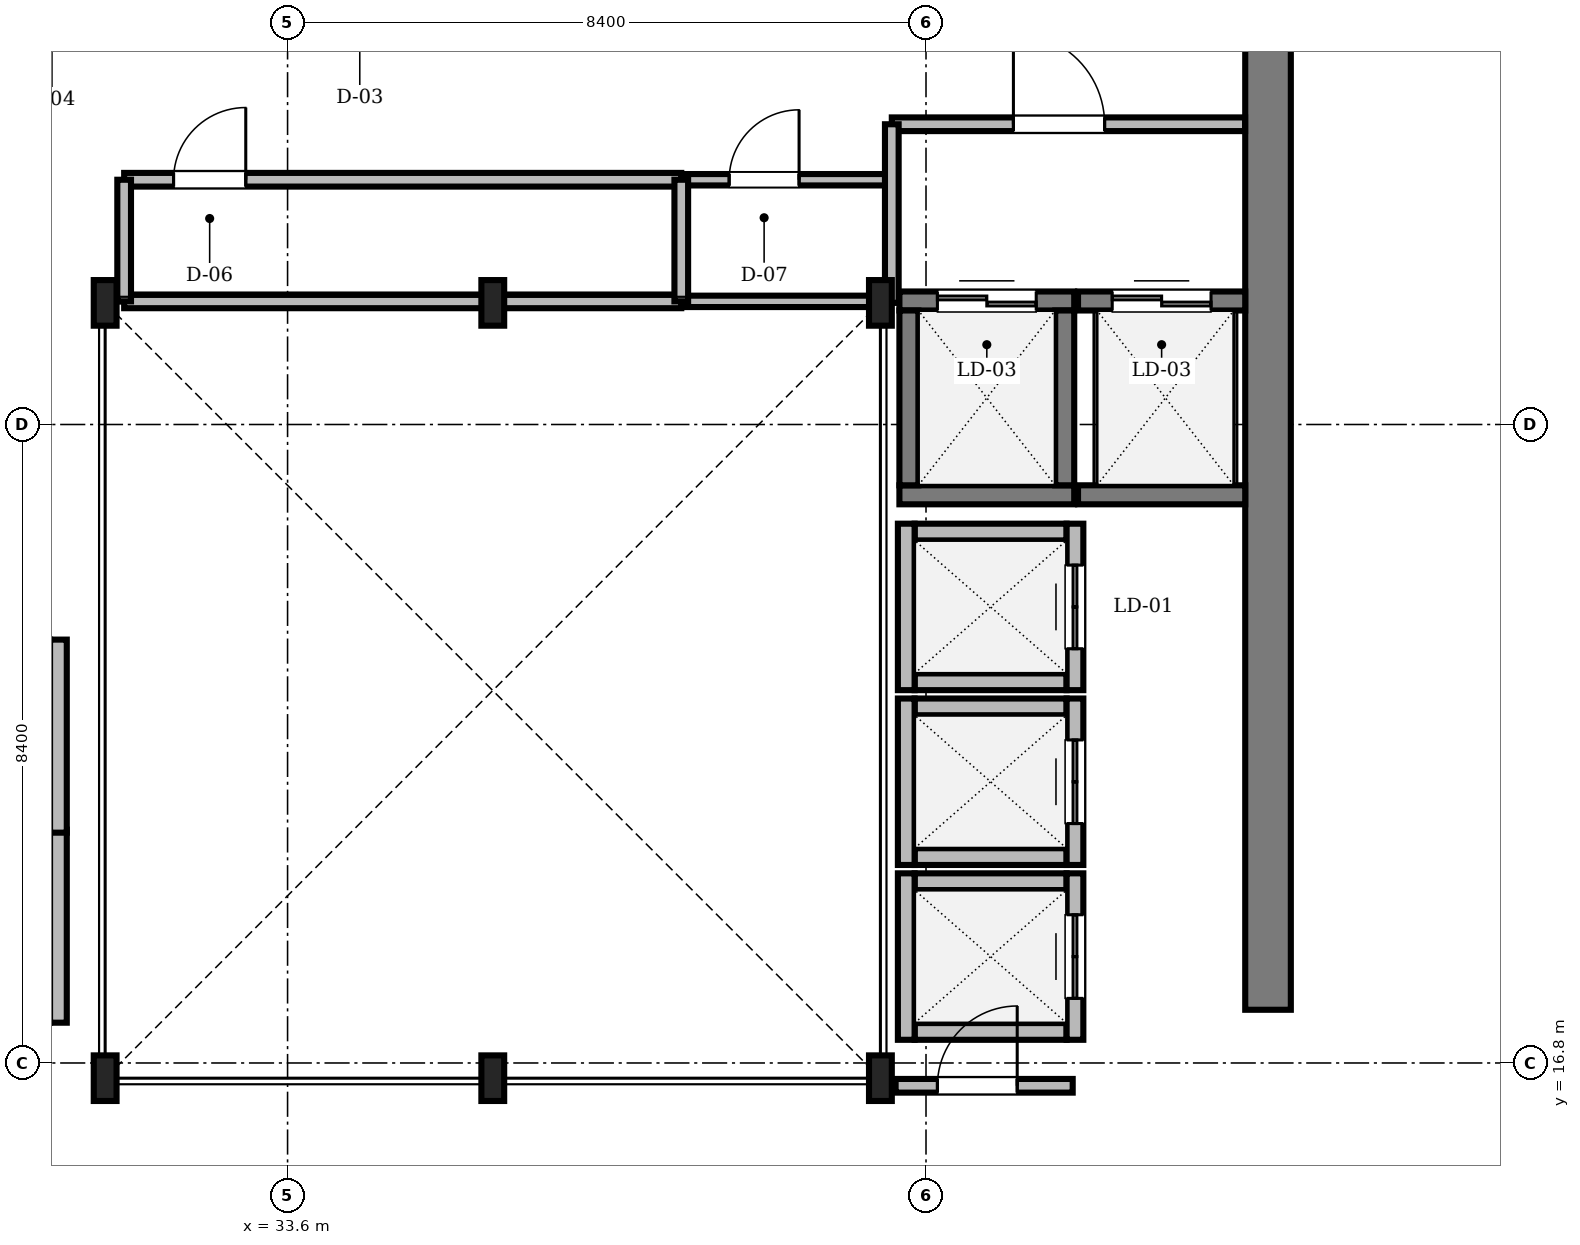
"""IFC4 building model, lengths in metres.
Left out: names, types, materials, properties, quantities, classifications, styles, units other than length and angle.
Written with IfcOpenShell. Run it as: python <this file> out.ifc"""

import sys

from ifc_helpers import new_model, si_unit, direction, frame, frame_2d, origin, origin_2d, place, context, subcontext, project, spatial, rectangle, i_section, extrude, source, transform, mapped, element, fill, save


model = new_model("IFC4")
c1 = context("Model", 3, precision=1e-05, world=origin(), true_north=direction((0.0, 1.0)))
c2 = subcontext(c1, "Body", "Model", "MODEL_VIEW")
j1 = project(units=[si_unit("LENGTHUNIT", "METRE"), si_unit("PLANEANGLEUNIT", "RADIAN")], contexts=[c1])
p1 = place(None, origin())
s1 = spatial("IfcSite", under=j1, at=p1, CompositionType="ELEMENT")
p2 = place(p1, origin())
s2 = spatial("IfcBuilding", under=s1, at=p2, CompositionType="ELEMENT")
p3 = place(p2, frame((0.0, 0.0, 282.2)))
s3 = spatial("IfcBuildingStorey", under=s2, at=p3, CompositionType="ELEMENT", Elevation=282.2)
m1 = source(origin(), c2, "Body", "SweptSolid", [
    extrude(rectangle(XDim=13.15, YDim=0.6, at=frame_2d((6.575, 0.0))), origin(), (0.0, 0.0, 1.0), 3.3),
])
p4 = place(p3, frame((46.5, 17.5, 0.0), z_axis=(0.0, 0.0, 1.0), x_axis=(0.0, 1.0, 0.0)))
e1 = element("IfcWall", 1, at=p4, inside=s3, PredefinedType="SHEAR", context=c2, shape_type="MappedRepresentation", body=[
    mapped(m1, transform((0.0, 0.0, 0.0), scale=1.0)),
])
m2 = source(origin(), c2, "Body", "SweptSolid", [
    extrude(i_section(OverallWidth=0.3, OverallDepth=0.6, WebThickness=0.015, FlangeThickness=0.03, FilletRadius=0.027, at=origin_2d()), origin(), (0.0, 0.0, 1.0), 3.3),
])
for number, where, z_axis, x_axis in (
    (2, (31.2, 16.6, 0.0), (0.0, 0.0, 1.0), (1.0, 0.0, 0.0)),
    (3, (36.3, 16.6, 0.0), (0.0, 0.0, 1.0), (1.0, 0.0, 0.0)),
    (4, (41.4, 16.6, 0.0), (0.0, 0.0, 1.0), (1.0, 0.0, 0.0)),
    (5, (41.4, 26.8, 0.0), (0.0, 0.0, 1.0), (1.0, 0.0, 0.0)),
    (6, (36.3, 26.8, 0.0), (0.0, 0.0, 1.0), (1.0, 0.0, 0.0)),
    (7, (31.2, 26.8, 0.0), (0.0, 0.0, 1.0), (1.0, 0.0, 0.0)),
):
    element("IfcColumn", number, at=place(p3, frame(where, z_axis=z_axis, x_axis=x_axis)), inside=s3, PredefinedType="COLUMN", context=c2, shape_type="MappedRepresentation", body=[
        mapped(m2, transform((0.0, 0.0, 0.0), scale=1.0)),
    ])
m3 = source(origin(), c2, "Body", "SweptSolid", [
    extrude(rectangle(XDim=2.0, YDim=0.22, at=frame_2d((1.0, 0.0))), origin(), (0.0, 0.0, 1.0), 3.3),
])
for number, where, z_axis, x_axis in (
    (8, (41.85, 21.815, 0.0), (0.0, 0.0, 1.0), (1.0, 0.0, 0.0)),
    (9, (41.85, 23.785, 0.0), (0.0, 0.0, 1.0), (1.0, 0.0, 0.0)),
):
    element("IfcWall", number, at=place(p3, frame(where, z_axis=z_axis, x_axis=x_axis)), inside=s3, PredefinedType="SOLIDWALL", context=c2, shape_type="MappedRepresentation", body=[
        mapped(m3, transform((0.0, 0.0, 0.0), scale=1.0)),
    ])
m4 = source(origin(), c2, "Body", "SweptSolid", [
    extrude(rectangle(XDim=2.19, YDim=0.22, at=frame_2d((1.095, 0.0))), origin(), (0.0, 0.0, 1.0), 3.3),
])
p5 = place(p3, frame((41.74, 21.705, 0.0), z_axis=(0.0, 0.0, 1.0), x_axis=(0.0, 1.0, 0.0)))
e10 = element("IfcWall", 10, at=p5, inside=s3, PredefinedType="SOLIDWALL", context=c2, shape_type="MappedRepresentation", body=[
    mapped(m4, transform((0.0, 0.0, 0.0), scale=1.0)),
])
p6 = place(p3, frame((43.96, 21.705, 0.0), z_axis=(0.0, 0.0, 1.0), x_axis=(0.0, 1.0, 0.0)))
e11 = element("IfcWall", 11, at=p6, inside=s3, PredefinedType="SOLIDWALL", context=c2, shape_type="MappedRepresentation", body=[
    mapped(m4, transform((0.0, 0.0, 0.0), scale=1.0)),
])
m5 = source(origin(), c2, "Body", "SweptSolid", [
    extrude(rectangle(XDim=1.1, YDim=2.2, at=frame_2d((0.55, 1.1))), frame((0.0, 0.12, 0.0), z_axis=(0.0, -1.0, 0.0), x_axis=(1.0, 0.0, 0.0)), (0.0, 0.0, 1.0), 0.24),
])
p7 = place(p6, frame((0.545, 0.0, 0.0)))
e12 = element("IfcOpeningElement", 12, at=p7, cuts=e11, PredefinedType="OPENING", context=c2, shape_type="MappedRepresentation", body=[
    mapped(m5, transform((0.0, 0.0, 0.0), scale=1.0)),
])
for number, where, z_axis, x_axis in (
    (13, (41.85, 19.515, 0.0), (0.0, 0.0, 1.0), (1.0, 0.0, 0.0)),
    (14, (41.85, 21.485, 0.0), (0.0, 0.0, 1.0), (1.0, 0.0, 0.0)),
):
    element("IfcWall", number, at=place(p3, frame(where, z_axis=z_axis, x_axis=x_axis)), inside=s3, PredefinedType="SOLIDWALL", context=c2, shape_type="MappedRepresentation", body=[
        mapped(m3, transform((0.0, 0.0, 0.0), scale=1.0)),
    ])
p8 = place(p3, frame((41.74, 19.405, 0.0), z_axis=(0.0, 0.0, 1.0), x_axis=(0.0, 1.0, 0.0)))
e15 = element("IfcWall", 15, at=p8, inside=s3, PredefinedType="SOLIDWALL", context=c2, shape_type="MappedRepresentation", body=[
    mapped(m4, transform((0.0, 0.0, 0.0), scale=1.0)),
])
p9 = place(p3, frame((43.96, 19.405, 0.0), z_axis=(0.0, 0.0, 1.0), x_axis=(0.0, 1.0, 0.0)))
e16 = element("IfcWall", 16, at=p9, inside=s3, PredefinedType="SOLIDWALL", context=c2, shape_type="MappedRepresentation", body=[
    mapped(m4, transform((0.0, 0.0, 0.0), scale=1.0)),
])
p10 = place(p9, frame((0.545, 0.0, 0.0)))
e17 = element("IfcOpeningElement", 17, at=p10, cuts=e16, PredefinedType="OPENING", context=c2, shape_type="MappedRepresentation", body=[
    mapped(m5, transform((0.0, 0.0, 0.0), scale=1.0)),
])
for number, where, z_axis, x_axis in (
    (18, (41.85, 17.215, 0.0), (0.0, 0.0, 1.0), (1.0, 0.0, 0.0)),
    (19, (41.85, 19.185, 0.0), (0.0, 0.0, 1.0), (1.0, 0.0, 0.0)),
):
    element("IfcWall", number, at=place(p3, frame(where, z_axis=z_axis, x_axis=x_axis)), inside=s3, PredefinedType="SOLIDWALL", context=c2, shape_type="MappedRepresentation", body=[
        mapped(m3, transform((0.0, 0.0, 0.0), scale=1.0)),
    ])
p11 = place(p3, frame((41.74, 17.105, 0.0), z_axis=(0.0, 0.0, 1.0), x_axis=(0.0, 1.0, 0.0)))
e20 = element("IfcWall", 20, at=p11, inside=s3, PredefinedType="SOLIDWALL", context=c2, shape_type="MappedRepresentation", body=[
    mapped(m4, transform((0.0, 0.0, 0.0), scale=1.0)),
])
p12 = place(p3, frame((43.96, 17.105, 0.0), z_axis=(0.0, 0.0, 1.0), x_axis=(0.0, 1.0, 0.0)))
e21 = element("IfcWall", 21, at=p12, inside=s3, PredefinedType="SOLIDWALL", context=c2, shape_type="MappedRepresentation", body=[
    mapped(m4, transform((0.0, 0.0, 0.0), scale=1.0)),
])
p13 = place(p12, frame((0.545, 0.0, 0.0)))
e22 = element("IfcOpeningElement", 22, at=p13, cuts=e21, PredefinedType="OPENING", context=c2, shape_type="MappedRepresentation", body=[
    mapped(m5, transform((0.0, 0.0, 0.0), scale=1.0)),
])
m6 = source(origin(), c2, "Body", "SweptSolid", [
    extrude(rectangle(XDim=2.54, YDim=0.22, at=frame_2d((1.27, 0.0))), origin(), (0.0, 0.0, 1.0), 3.3),
])
for number, where, z_axis, x_axis in (
    (23, (30.585, 17.33, 0.0), (0.0, 0.0, 1.0), (0.0, 1.0, 0.0)),
    (24, (30.585, 19.83, 0.0), (0.0, 0.0, 1.0), (0.0, 1.0, 0.0)),
):
    element("IfcWall", number, at=place(p3, frame(where, z_axis=z_axis, x_axis=x_axis)), inside=s3, PredefinedType="SOLIDWALL", context=c2, shape_type="MappedRepresentation", body=[
        mapped(m6, transform((0.0, 0.0, 0.0), scale=1.0)),
    ])
m7 = source(origin(), c2, "Body", "SweptSolid", [
    extrude(rectangle(XDim=2.3, YDim=0.25, at=frame_2d((1.15, 0.0))), origin(), (0.0, 0.0, 1.0), 3.3),
])
p14 = place(p3, frame((41.65, 24.275, 0.0), z_axis=(0.0, 0.0, 1.0), x_axis=(1.0, 0.0, 0.0)))
e25 = element("IfcWall", 25, at=p14, inside=s3, PredefinedType="SOLIDWALL", context=c2, shape_type="MappedRepresentation", body=[
    mapped(m7, transform((0.0, 0.0, 0.0), scale=1.0)),
])
p15 = place(p3, frame((41.65, 26.825, 0.0), z_axis=(0.0, 0.0, 1.0), x_axis=(1.0, 0.0, 0.0)))
e26 = element("IfcWall", 26, at=p15, inside=s3, PredefinedType="SOLIDWALL", context=c2, shape_type="MappedRepresentation", body=[
    mapped(m7, transform((0.0, 0.0, 0.0), scale=1.0)),
])
m8 = source(origin(), c2, "Body", "SweptSolid", [
    extrude(rectangle(XDim=1.3, YDim=2.3, at=frame_2d((0.65, 1.15))), frame((0.0, 0.135, 0.0), z_axis=(0.0, -1.0, 0.0), x_axis=(1.0, 0.0, 0.0)), (0.0, 0.0, 1.0), 0.27),
])
p16 = place(p15, frame((0.5, 0.0, 0.0)))
e27 = element("IfcOpeningElement", 27, at=p16, cuts=e26, PredefinedType="OPENING", context=c2, shape_type="MappedRepresentation", body=[
    mapped(m8, transform((0.0, 0.0, 0.0), scale=1.0)),
])
for number, where, z_axis, x_axis in (
    (28, (41.775, 24.4, 0.0), (0.0, 0.0, 1.0), (0.0, 1.0, 0.0)),
    (29, (43.825, 24.4, 0.0), (0.0, 0.0, 1.0), (0.0, 1.0, 0.0)),
):
    element("IfcWall", number, at=place(p3, frame(where, z_axis=z_axis, x_axis=x_axis)), inside=s3, PredefinedType="SOLIDWALL", context=c2, shape_type="MappedRepresentation", body=[
        mapped(m7, transform((0.0, 0.0, 0.0), scale=1.0)),
    ])
m9 = source(origin(), c2, "Body", "SweptSolid", [
    extrude(rectangle(XDim=2.2, YDim=0.25, at=frame_2d((1.1, 0.0))), origin(), (0.0, 0.0, 1.0), 3.3),
])
p17 = place(p3, frame((44.0, 24.275, 0.0), z_axis=(0.0, 0.0, 1.0), x_axis=(1.0, 0.0, 0.0)))
e30 = element("IfcWall", 30, at=p17, inside=s3, PredefinedType="SOLIDWALL", context=c2, shape_type="MappedRepresentation", body=[
    mapped(m9, transform((0.0, 0.0, 0.0), scale=1.0)),
])
p18 = place(p3, frame((44.0, 26.825, 0.0), z_axis=(0.0, 0.0, 1.0), x_axis=(1.0, 0.0, 0.0)))
e31 = element("IfcWall", 31, at=p18, inside=s3, PredefinedType="SOLIDWALL", context=c2, shape_type="MappedRepresentation", body=[
    mapped(m9, transform((0.0, 0.0, 0.0), scale=1.0)),
])
p19 = place(p18, frame((0.45, 0.0, 0.0)))
e32 = element("IfcOpeningElement", 32, at=p19, cuts=e31, PredefinedType="OPENING", context=c2, shape_type="MappedRepresentation", body=[
    mapped(m8, transform((0.0, 0.0, 0.0), scale=1.0)),
])
m10 = source(origin(), c2, "Body", "SweptSolid", [
    extrude(rectangle(XDim=7.33, YDim=0.18, at=frame_2d((3.665, 0.0))), origin(), (0.0, 0.0, 1.0), 2.932),
])
p20 = place(p3, frame((31.45, 28.42, 0.0), z_axis=(0.0, 0.0, 1.0), x_axis=(1.0, 0.0, 0.0)))
e33 = element("IfcWall", 33, at=p20, inside=s3, PredefinedType="PARTITIONING", context=c2, shape_type="MappedRepresentation", body=[
    mapped(m10, transform((0.0, 0.0, 0.0), scale=1.0)),
])
m11 = source(origin(), c2, "Body", "SweptSolid", [
    extrude(rectangle(XDim=0.95, YDim=2.15, at=frame_2d((0.475, 1.075))), frame((0.0, 0.1, 0.0), z_axis=(0.0, -1.0, 0.0), x_axis=(1.0, 0.0, 0.0)), (0.0, 0.0, 1.0), 0.2),
])
p21 = place(p20, frame((0.65, 0.0, 0.0)))
e34 = element("IfcOpeningElement", 34, at=p21, cuts=e33, PredefinedType="OPENING", context=c2, shape_type="MappedRepresentation", body=[
    mapped(m11, transform((0.0, 0.0, 0.0), scale=1.0)),
])
m12 = source(origin(), c2, "Body", "SweptSolid", [
    extrude(rectangle(XDim=4.648, YDim=0.18, at=frame_2d((2.324, 0.0))), origin(), (0.0, 0.0, 1.0), 2.932),
])
p22 = place(p3, frame((41.55, 29.15, 0.0), z_axis=(0.0, 0.0, 1.0), x_axis=(1.0, 0.0, 0.0)))
e35 = element("IfcWall", 35, at=p22, inside=s3, PredefinedType="PARTITIONING", context=c2, shape_type="MappedRepresentation", body=[
    mapped(m12, transform((0.0, 0.0, 0.0), scale=1.0)),
])
m13 = source(origin(), c2, "Body", "SweptSolid", [
    extrude(rectangle(XDim=1.2, YDim=2.2, at=frame_2d((0.6, 1.1))), frame((0.0, 0.1, 0.0), z_axis=(0.0, -1.0, 0.0), x_axis=(1.0, 0.0, 0.0)), (0.0, 0.0, 1.0), 0.2),
])
p23 = place(p22, frame((1.6, 0.0, 0.0)))
e36 = element("IfcOpeningElement", 36, at=p23, cuts=e35, PredefinedType="OPENING", context=c2, shape_type="MappedRepresentation", body=[
    mapped(m13, transform((0.0, 0.0, 0.0), scale=1.0)),
])
m14 = source(origin(), c2, "Body", "SweptSolid", [
    extrude(rectangle(XDim=2.74, YDim=0.15, at=frame_2d((1.37, 0.0))), origin(), (0.0, 0.0, 1.0), 3.3),
])
p24 = place(p3, frame((38.78, 28.42, 0.0), z_axis=(0.0, 0.0, 1.0), x_axis=(1.0, 0.0, 0.0)))
e37 = element("IfcWall", 37, at=p24, inside=s3, PredefinedType="PARTITIONING", context=c2, shape_type="MappedRepresentation", body=[
    mapped(m14, transform((0.0, 0.0, 0.0), scale=1.0)),
])
m15 = source(origin(), c2, "Body", "SweptSolid", [
    extrude(rectangle(XDim=0.92, YDim=2.1, at=frame_2d((0.46, 1.05))), frame((0.0, 0.085, 0.0), z_axis=(0.0, -1.0, 0.0), x_axis=(1.0, 0.0, 0.0)), (0.0, 0.0, 1.0), 0.17),
])
p25 = place(p24, frame((0.63, 0.0, 0.0)))
e38 = element("IfcOpeningElement", 38, at=p25, cuts=e37, PredefinedType="OPENING", context=c2, shape_type="MappedRepresentation", body=[
    mapped(m15, transform((0.0, 0.0, 0.0), scale=1.0)),
])
m16 = source(origin(), c2, "Body", "SweptSolid", [
    extrude(rectangle(XDim=2.33, YDim=0.18, at=frame_2d((1.165, 0.0))), origin(), (0.0, 0.0, 1.0), 2.478),
])
p26 = place(p3, frame((41.6, 16.5, 0.0), z_axis=(0.0, 0.0, 1.0), x_axis=(1.0, 0.0, 0.0)))
e39 = element("IfcWall", 39, at=p26, inside=s3, PredefinedType="PARTITIONING", context=c2, shape_type="MappedRepresentation", body=[
    mapped(m16, transform((0.0, 0.0, 0.0), scale=1.0)),
])
m17 = source(origin(), c2, "Body", "SweptSolid", [
    extrude(rectangle(XDim=1.05, YDim=2.2, at=frame_2d((0.525, 1.1))), frame((0.0, 0.1, 0.0), z_axis=(0.0, -1.0, 0.0), x_axis=(1.0, 0.0, 0.0)), (0.0, 0.0, 1.0), 0.2),
])
p27 = place(p26, frame((0.55, 0.0, 0.0)))
e40 = element("IfcOpeningElement", 40, at=p27, cuts=e39, PredefinedType="OPENING", context=c2, shape_type="MappedRepresentation", body=[
    mapped(m17, transform((0.0, 0.0, 0.0), scale=1.0)),
])
m18 = source(origin(), c2, "Body", "SweptSolid", [
    extrude(rectangle(XDim=7.33, YDim=0.18, at=frame_2d((3.665, 0.0))), origin(), (0.0, 0.0, 1.0), 2.842),
])
p28 = place(p3, frame((31.45, 26.82, 0.0), z_axis=(0.0, 0.0, 1.0), x_axis=(1.0, 0.0, 0.0)))
e41 = element("IfcWall", 41, at=p28, inside=s3, PredefinedType="PARTITIONING", context=c2, shape_type="MappedRepresentation", body=[
    mapped(m18, transform((0.0, 0.0, 0.0), scale=1.0)),
])
m19 = source(origin(), c2, "Body", "SweptSolid", [
    extrude(rectangle(XDim=2.74, YDim=0.15, at=frame_2d((1.37, 0.0))), origin(), (0.0, 0.0, 1.0), 2.842),
])
p29 = place(p3, frame((38.78, 26.82, 0.0), z_axis=(0.0, 0.0, 1.0), x_axis=(1.0, 0.0, 0.0)))
e42 = element("IfcWall", 42, at=p29, inside=s3, PredefinedType="PARTITIONING", context=c2, shape_type="MappedRepresentation", body=[
    mapped(m19, transform((0.0, 0.0, 0.0), scale=1.0)),
])
m20 = source(origin(), c2, "Body", "SweptSolid", [
    extrude(rectangle(XDim=2.35, YDim=0.18, at=frame_2d((1.175, 0.0))), origin(), (0.0, 0.0, 1.0), 2.932),
])
p30 = place(p3, frame((41.55, 26.8, 0.0), z_axis=(0.0, 0.0, 1.0), x_axis=(0.0, 1.0, 0.0)))
e43 = element("IfcWall", 43, at=p30, inside=s3, PredefinedType="PARTITIONING", context=c2, shape_type="MappedRepresentation", body=[
    mapped(m20, transform((0.0, 0.0, 0.0), scale=1.0)),
])
m21 = source(origin(), c2, "Body", "SweptSolid", [
    extrude(rectangle(XDim=1.6, YDim=0.18, at=frame_2d((0.8, 0.0))), origin(), (0.0, 0.0, 1.0), 2.842),
])
for number, where, z_axis, x_axis in (
    (44, (31.45, 26.82, 0.0), (0.0, 0.0, 1.0), (0.0, 1.0, 0.0)),
    (45, (38.78, 26.82, 0.0), (0.0, 0.0, 1.0), (0.0, 1.0, 0.0)),
):
    element("IfcWall", number, at=place(p3, frame(where, z_axis=z_axis, x_axis=x_axis)), inside=s3, PredefinedType="PARTITIONING", context=c2, shape_type="MappedRepresentation", body=[
        mapped(m21, transform((0.0, 0.0, 0.0), scale=1.0)),
    ])
m22 = source(origin(), c2, "Body", "SweptSolid", [
    extrude(rectangle(XDim=1.1, YDim=2.2, at=frame_2d((0.55, 1.1))), frame((0.0, 0.025, 0.0), z_axis=(0.0, -1.0, 0.0), x_axis=(1.0, 0.0, 0.0)), (0.0, 0.0, 1.0), 0.05),
])
p31 = place(p7, origin())
e46 = element("IfcDoor", 46, at=p31, inside=s3, OperationType="DOUBLE_DOOR_SLIDING", PredefinedType="DOOR", context=c2, shape_type="MappedRepresentation", body=[
    mapped(m22, transform((0.0, 0.0, 0.0), scale=1.0)),
])
fill(e12, e46)
p32 = place(p10, origin())
e47 = element("IfcDoor", 47, at=p32, inside=s3, OperationType="DOUBLE_DOOR_SLIDING", PredefinedType="DOOR", context=c2, shape_type="MappedRepresentation", body=[
    mapped(m22, transform((0.0, 0.0, 0.0), scale=1.0)),
])
fill(e17, e47)
p33 = place(p13, origin())
e48 = element("IfcDoor", 48, at=p33, inside=s3, OperationType="DOUBLE_DOOR_SLIDING", PredefinedType="DOOR", context=c2, shape_type="MappedRepresentation", body=[
    mapped(m22, transform((0.0, 0.0, 0.0), scale=1.0)),
])
fill(e22, e48)
m23 = source(origin(), c2, "Body", "SweptSolid", [
    extrude(rectangle(XDim=1.3, YDim=2.3, at=frame_2d((0.65, 1.15))), frame((0.0, 0.025, 0.0), z_axis=(0.0, -1.0, 0.0), x_axis=(1.0, 0.0, 0.0)), (0.0, 0.0, 1.0), 0.05),
])
p34 = place(p16, origin())
e49 = element("IfcDoor", 49, at=p34, inside=s3, OperationType="DOUBLE_DOOR_SLIDING", PredefinedType="DOOR", context=c2, shape_type="MappedRepresentation", body=[
    mapped(m23, transform((0.0, 0.0, 0.0), scale=1.0)),
])
fill(e27, e49)
p35 = place(p19, origin())
e50 = element("IfcDoor", 50, at=p35, inside=s3, OperationType="DOUBLE_DOOR_SLIDING", PredefinedType="DOOR", context=c2, shape_type="MappedRepresentation", body=[
    mapped(m23, transform((0.0, 0.0, 0.0), scale=1.0)),
])
fill(e32, e50)
m24 = source(origin(), c2, "Body", "SweptSolid", [
    extrude(rectangle(XDim=0.95, YDim=2.15, at=frame_2d((0.475, 1.075))), frame((0.0, 0.025, 0.0), z_axis=(0.0, -1.0, 0.0), x_axis=(1.0, 0.0, 0.0)), (0.0, 0.0, 1.0), 0.05),
])
p36 = place(p21, origin())
e51 = element("IfcDoor", 51, at=p36, inside=s3, OperationType="SINGLE_SWING_RIGHT", PredefinedType="DOOR", context=c2, shape_type="MappedRepresentation", body=[
    mapped(m24, transform((0.0, 0.0, 0.0), scale=1.0)),
])
fill(e34, e51)
m25 = source(origin(), c2, "Body", "SweptSolid", [
    extrude(rectangle(XDim=1.2, YDim=2.2, at=frame_2d((0.6, 1.1))), frame((0.0, 0.025, 0.0), z_axis=(0.0, -1.0, 0.0), x_axis=(1.0, 0.0, 0.0)), (0.0, 0.0, 1.0), 0.05),
])
p37 = place(p23, origin())
e52 = element("IfcDoor", 52, at=p37, inside=s3, OperationType="SINGLE_SWING_LEFT", PredefinedType="DOOR", context=c2, shape_type="MappedRepresentation", body=[
    mapped(m25, transform((0.0, 0.0, 0.0), scale=1.0)),
])
fill(e36, e52)
m26 = source(origin(), c2, "Body", "SweptSolid", [
    extrude(rectangle(XDim=0.92, YDim=2.1, at=frame_2d((0.46, 1.05))), frame((0.0, 0.025, 0.0), z_axis=(0.0, -1.0, 0.0), x_axis=(1.0, 0.0, 0.0)), (0.0, 0.0, 1.0), 0.05),
])
p38 = place(p25, origin())
e53 = element("IfcDoor", 53, at=p38, inside=s3, OperationType="SINGLE_SWING_RIGHT", PredefinedType="DOOR", context=c2, shape_type="MappedRepresentation", body=[
    mapped(m26, transform((0.0, 0.0, 0.0), scale=1.0)),
])
fill(e38, e53)
m27 = source(origin(), c2, "Body", "SweptSolid", [
    extrude(rectangle(XDim=1.05, YDim=2.2, at=frame_2d((0.525, 1.1))), frame((0.0, 0.025, 0.0), z_axis=(0.0, -1.0, 0.0), x_axis=(1.0, 0.0, 0.0)), (0.0, 0.0, 1.0), 0.05),
])
p39 = place(p27, origin())
e54 = element("IfcDoor", 54, at=p39, inside=s3, OperationType="SINGLE_SWING_RIGHT", PredefinedType="DOOR", context=c2, shape_type="MappedRepresentation", body=[
    mapped(m27, transform((0.0, 0.0, 0.0), scale=1.0)),
])
fill(e40, e54)
save(model, sys.argv[1])
